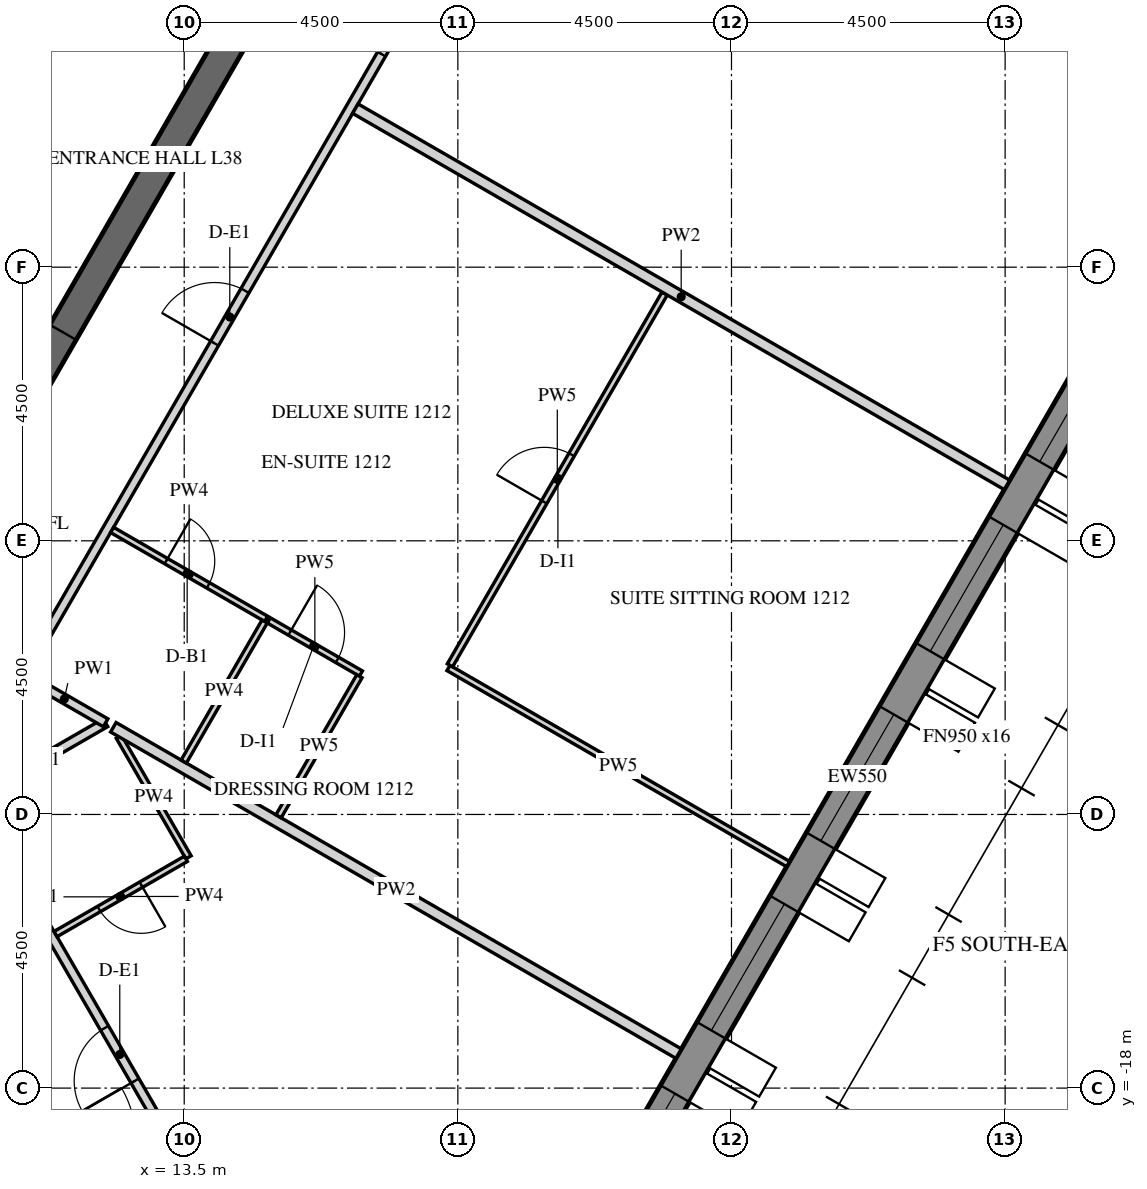
"""IFC4 building model, lengths in metres.
Left out: names, types, materials, properties, quantities, classifications, styles, units other than length and angle.
Written with IfcOpenShell. Run it as: python <this file> out.ifc"""

import sys

from ifc_helpers import new_model, si_unit, direction, frame, frame_2d, origin, place, context, subcontext, project, spatial, polyline, rectangle, outline, extrude, element, fill, save


model = new_model("IFC4")
c1 = context("Model", 3, precision=1e-05, world=origin(), true_north=direction((0.0, 1.0)))
c2 = subcontext(c1, "Body", "Model", "MODEL_VIEW")
j1 = project(units=[si_unit("LENGTHUNIT", "METRE"), si_unit("PLANEANGLEUNIT", "RADIAN")], contexts=[c1])
p1 = place(None, origin())
s1 = spatial("IfcSite", under=j1, at=p1, CompositionType="ELEMENT")
p2 = place(p1, origin())
s2 = spatial("IfcBuilding", under=s1, at=p2, CompositionType="ELEMENT")
p3 = place(p2, frame((0.0, 0.0, 164.4)))
s3 = spatial("IfcBuildingStorey", under=s2, at=p3, CompositionType="ELEMENT", Elevation=164.4)
p4 = place(p3, frame((17.63, -24.914, -0.15), z_axis=(0.0, 0.0, 1.0), x_axis=(0.499998569178, 0.866026229868, 0.0)))
e1 = element("IfcWall", 1, at=p4, inside=s3, PredefinedType="SOLIDWALL", context=c2, shape_type="SweptSolid", body=[
    extrude(outline(polyline([(-0.022, -0.275), (27.783, -0.275), (27.732, 0.275), (0.022, 0.275), (-0.022, -0.275)])), origin(), (0.0, 0.0, 1.0), 3.9),
])
p5 = place(p4, frame((1.879, 0.0, 1.05)))
e2 = element("IfcOpeningElement", 2, at=p5, cuts=e1, PredefinedType="OPENING", context=c2, shape_type="SweptSolid", body=[
    extrude(rectangle(XDim=2.4, YDim=2.4, at=frame_2d((1.2, 1.2))), frame((0.0, 0.285, 0.0), z_axis=(0.0, -1.0, 0.0), x_axis=(1.0, 0.0, 0.0)), (0.0, 0.0, 1.0), 0.57),
])
p6 = place(p4, frame((5.479, 0.0, 1.05)))
e3 = element("IfcOpeningElement", 3, at=p6, cuts=e1, PredefinedType="OPENING", context=c2, shape_type="SweptSolid", body=[
    extrude(rectangle(XDim=2.4, YDim=2.4, at=frame_2d((1.2, 1.2))), frame((0.0, 0.285, 0.0), z_axis=(0.0, -1.0, 0.0), x_axis=(1.0, 0.0, 0.0)), (0.0, 0.0, 1.0), 0.57),
])
p7 = place(p4, frame((9.079, 0.0, 1.05)))
e4 = element("IfcOpeningElement", 4, at=p7, cuts=e1, PredefinedType="OPENING", context=c2, shape_type="SweptSolid", body=[
    extrude(rectangle(XDim=2.4, YDim=2.4, at=frame_2d((1.2, 1.2))), frame((0.0, 0.285, 0.0), z_axis=(0.0, -1.0, 0.0), x_axis=(1.0, 0.0, 0.0)), (0.0, 0.0, 1.0), 0.57),
])
p8 = place(p4, frame((12.679, 0.0, 1.05)))
e5 = element("IfcOpeningElement", 5, at=p8, cuts=e1, PredefinedType="OPENING", context=c2, shape_type="SweptSolid", body=[
    extrude(rectangle(XDim=2.4, YDim=2.4, at=frame_2d((1.2, 1.2))), frame((0.0, 0.285, 0.0), z_axis=(0.0, -1.0, 0.0), x_axis=(1.0, 0.0, 0.0)), (0.0, 0.0, 1.0), 0.57),
])
p9 = place(p4, frame((16.279, 0.0, 1.05)))
e6 = element("IfcOpeningElement", 6, at=p9, cuts=e1, PredefinedType="OPENING", context=c2, shape_type="SweptSolid", body=[
    extrude(rectangle(XDim=2.4, YDim=2.4, at=frame_2d((1.2, 1.2))), frame((0.0, 0.285, 0.0), z_axis=(0.0, -1.0, 0.0), x_axis=(1.0, 0.0, 0.0)), (0.0, 0.0, 1.0), 0.57),
])
p10 = place(p4, frame((19.879, 0.0, 1.05)))
e7 = element("IfcOpeningElement", 7, at=p10, cuts=e1, PredefinedType="OPENING", context=c2, shape_type="SweptSolid", body=[
    extrude(rectangle(XDim=2.4, YDim=2.4, at=frame_2d((1.2, 1.2))), frame((0.0, 0.285, 0.0), z_axis=(0.0, -1.0, 0.0), x_axis=(1.0, 0.0, 0.0)), (0.0, 0.0, 1.0), 0.57),
])
p11 = place(p4, frame((23.479, 0.0, 1.05)))
e8 = element("IfcOpeningElement", 8, at=p11, cuts=e1, PredefinedType="OPENING", context=c2, shape_type="SweptSolid", body=[
    extrude(rectangle(XDim=2.4, YDim=2.4, at=frame_2d((1.2, 1.2))), frame((0.0, 0.285, 0.0), z_axis=(0.0, -1.0, 0.0), x_axis=(1.0, 0.0, 0.0)), (0.0, 0.0, 1.0), 0.57),
])
p12 = place(p3, frame((7.361, -12.75, -0.15), z_axis=(0.0, 0.0, 1.0), x_axis=(0.50000571537, 0.866022103989, 0.0)))
e9 = element("IfcWall", 9, at=p12, inside=s3, PredefinedType="SHEAR", context=c2, shape_type="SweptSolid", body=[
    extrude(outline(polyline([(-0.144, -0.25), (14.867, -0.25), (14.578, 0.25), (0.144, 0.25), (-0.144, -0.25)])), origin(), (0.0, 0.0, 1.0), 3.9),
])
p13 = place(p12, frame((6.49, 0.0, 0.15)))
e10 = element("IfcOpeningElement", 10, at=p13, cuts=e9, PredefinedType="OPENING", context=c2, shape_type="SweptSolid", body=[
    extrude(rectangle(XDim=1.8, YDim=2.4, at=frame_2d((0.9, 1.2))), frame((0.0, 0.26, 0.0), z_axis=(0.0, -1.0, 0.0), x_axis=(1.0, 0.0, 0.0)), (0.0, 0.0, 1.0), 0.52),
])
p14 = place(p3, frame((7.506, -13.0, -0.15), z_axis=(0.0, 0.0, 1.0), x_axis=(0.499988271576, -0.866032175087, 0.0)))
e11 = element("IfcWall", 11, at=p14, inside=s3, PredefinedType="SHEAR", context=c2, shape_type="SweptSolid", body=[
    extrude(rectangle(XDim=15.424, YDim=0.5, at=frame_2d((7.712, 0.0))), origin(), (0.0, 0.0, 1.0), 3.9),
])
p15 = place(p14, frame((6.812, 0.0, 0.15)))
e12 = element("IfcOpeningElement", 12, at=p15, cuts=e11, PredefinedType="OPENING", context=c2, shape_type="SweptSolid", body=[
    extrude(rectangle(XDim=1.8, YDim=2.4, at=frame_2d((0.9, 1.2))), frame((0.0, 0.26, 0.0), z_axis=(0.0, -1.0, 0.0), x_axis=(1.0, 0.0, 0.0)), (0.0, 0.0, 1.0), 0.52),
])
p16 = place(p3, frame((5.673, -9.825, -0.15), z_axis=(0.0, 0.0, 1.0), x_axis=(0.499995046907, 0.866028263435, 0.0)))
e13 = element("IfcWall", 13, at=p16, inside=s3, PredefinedType="SHEAR", context=c2, shape_type="SweptSolid", body=[
    extrude(outline(polyline([(-0.101, -0.175), (11.446, -0.175), (11.244, 0.175), (0.101, 0.175), (-0.101, -0.175)])), origin(), (0.0, 0.0, 1.0), 3.9),
])
p17 = place(p16, frame((4.801, 0.0, 0.15)))
e14 = element("IfcOpeningElement", 14, at=p17, cuts=e13, PredefinedType="OPENING", context=c2, shape_type="SweptSolid", body=[
    extrude(rectangle(XDim=1.8, YDim=2.4, at=frame_2d((0.9, 1.2))), frame((0.0, 0.185, 0.0), z_axis=(0.0, -1.0, 0.0), x_axis=(1.0, 0.0, 0.0)), (0.0, 0.0, 1.0), 0.37),
])
p18 = place(p3, frame((13.699, -19.628, 0.0), z_axis=(0.0, 0.0, 1.0), x_axis=(-0.499995202058, 0.86602817386, 0.0)))
e15 = element("IfcWall", 15, at=p18, inside=s3, PredefinedType="PARTITIONING", context=c2, shape_type="SweptSolid", body=[
    extrude(rectangle(XDim=7.361, YDim=0.15, at=frame_2d((3.68, 0.0))), origin(), (0.0, 0.0, 1.0), 2.988),
])
p19 = place(p18, frame((2.018, 0.0, 0.0)))
e16 = element("IfcOpeningElement", 16, at=p19, cuts=e15, PredefinedType="OPENING", context=c2, shape_type="SweptSolid", body=[
    extrude(rectangle(XDim=1.0, YDim=2.1, at=frame_2d((0.5, 1.05))), frame((0.0, 0.085, 0.0), z_axis=(0.0, -1.0, 0.0), x_axis=(1.0, 0.0, 0.0)), (0.0, 0.0, 1.0), 0.17),
])
p20 = place(p3, frame((10.084, -13.216, 0.0), z_axis=(0.0, 0.0, 1.0), x_axis=(0.866026229868, 0.499998569178, 0.0)))
e17 = element("IfcWall", 17, at=p20, inside=s3, PredefinedType="PARTITIONING", context=c2, shape_type="SweptSolid", body=[
    extrude(rectangle(XDim=2.449, YDim=0.15, at=frame_2d((1.225, 0.0))), origin(), (0.0, 0.0, 1.0), 2.988),
])
p21 = place(p3, frame((10.887, -11.144, 0.0), z_axis=(0.0, 0.0, 1.0), x_axis=(0.500006037985, 0.866021917724, 0.0)))
e18 = element("IfcWall", 18, at=p21, inside=s3, PredefinedType="PARTITIONING", context=c2, shape_type="SweptSolid", body=[
    extrude(rectangle(XDim=12.867, YDim=0.15, at=frame_2d((6.434, 0.0))), origin(), (0.0, 0.0, 1.0), 2.988),
])
p22 = place(p21, frame((6.225, 0.0, 0.0)))
e19 = element("IfcOpeningElement", 19, at=p22, cuts=e18, PredefinedType="OPENING", context=c2, shape_type="SweptSolid", body=[
    extrude(rectangle(XDim=1.0, YDim=2.1, at=frame_2d((0.5, 1.05))), frame((0.0, 0.085, 0.0), z_axis=(0.0, -1.0, 0.0), x_axis=(1.0, 0.0, 0.0)), (0.0, 0.0, 1.0), 0.17),
])
p23 = place(p21, frame((11.717, 0.0, 0.0)))
e20 = element("IfcOpeningElement", 20, at=p23, cuts=e18, PredefinedType="OPENING", context=c2, shape_type="SweptSolid", body=[
    extrude(rectangle(XDim=1.0, YDim=2.1, at=frame_2d((0.5, 1.05))), frame((0.0, 0.085, 0.0), z_axis=(0.0, -1.0, 0.0), x_axis=(1.0, 0.0, 0.0)), (0.0, 0.0, 1.0), 0.17),
])
p24 = place(p3, frame((12.208, -11.993, 0.0), z_axis=(0.0, 0.0, 1.0), x_axis=(-0.866011891242, 0.50002340368, 0.0)))
e21 = element("IfcWall", 21, at=p24, inside=s3, PredefinedType="PARTITIONING", context=c2, shape_type="SweptSolid", body=[
    extrude(rectangle(XDim=1.568, YDim=0.15, at=frame_2d((0.784, 0.0))), origin(), (0.0, 0.0, 1.0), 2.988),
])
p25 = place(p3, frame((12.426, -12.223, 0.0), z_axis=(0.0, 0.0, 1.0), x_axis=(0.499959451571, -0.866048813165, 0.0)))
e22 = element("IfcWall", 22, at=p25, inside=s3, PredefinedType="PARTITIONING", context=c2, shape_type="SweptSolid", body=[
    extrude(rectangle(XDim=2.289, YDim=0.1, at=frame_2d((1.145, 0.0))), origin(), (0.0, 0.0, 1.0), 2.988),
])
p26 = place(p3, frame((13.527, -14.23, 0.0), z_axis=(0.0, 0.0, 1.0), x_axis=(-0.866006523861, -0.500032699561, 0.0)))
e23 = element("IfcWall", 23, at=p26, inside=s3, PredefinedType="PARTITIONING", context=c2, shape_type="SweptSolid", body=[
    extrude(rectangle(XDim=2.475, YDim=0.1, at=frame_2d((1.237, 0.0))), origin(), (0.0, 0.0, 1.0), 2.988),
])
p27 = place(p26, frame((0.85, 0.0, 0.0)))
e24 = element("IfcOpeningElement", 24, at=p27, cuts=e23, PredefinedType="OPENING", context=c2, shape_type="SweptSolid", body=[
    extrude(rectangle(XDim=0.8, YDim=2.1, at=frame_2d((0.4, 1.05))), frame((0.0, 0.06, 0.0), z_axis=(0.0, -1.0, 0.0), x_axis=(1.0, 0.0, 0.0)), (0.0, 0.0, 1.0), 0.12),
])
p28 = place(p3, frame((21.631, -17.433, 0.0), z_axis=(0.0, 0.0, 1.0), x_axis=(-0.866030310389, 0.499991501415, 0.0)))
e25 = element("IfcWall", 25, at=p28, inside=s3, PredefinedType="PARTITIONING", context=c2, shape_type="SweptSolid", body=[
    extrude(rectangle(XDim=10.735, YDim=0.18, at=frame_2d((5.368, 0.0))), origin(), (0.0, 0.0, 1.0), 2.988),
])
p29 = place(p3, frame((12.314, -8.821, 0.0), z_axis=(0.0, 0.0, 1.0), x_axis=(0.866046596414, -0.499963291492, 0.0)))
e26 = element("IfcWall", 26, at=p29, inside=s3, PredefinedType="PARTITIONING", context=c2, shape_type="SweptSolid", body=[
    extrude(rectangle(XDim=2.925, YDim=0.1, at=frame_2d((1.462, 0.0))), origin(), (0.0, 0.0, 1.0), 2.988),
])
p30 = place(p29, frame((1.025, 0.0, 0.0)))
e27 = element("IfcOpeningElement", 27, at=p30, cuts=e26, PredefinedType="OPENING", context=c2, shape_type="SweptSolid", body=[
    extrude(rectangle(XDim=0.8, YDim=2.1, at=frame_2d((0.4, 1.05))), frame((0.0, 0.06, 0.0), z_axis=(0.0, -1.0, 0.0), x_axis=(1.0, 0.0, 0.0)), (0.0, 0.0, 1.0), 0.12),
])
p31 = place(p3, frame((14.891, -10.309, 0.0), z_axis=(0.0, 0.0, 1.0), x_axis=(0.866036909293, -0.499980071345, 0.0)))
e28 = element("IfcWall", 28, at=p31, inside=s3, PredefinedType="PARTITIONING", context=c2, shape_type="SweptSolid", body=[
    extrude(rectangle(XDim=1.75, YDim=0.1, at=frame_2d((0.875, 0.0))), origin(), (0.0, 0.0, 1.0), 2.988),
])
p32 = place(p31, frame((0.4, 0.0, 0.0)))
e29 = element("IfcOpeningElement", 29, at=p32, cuts=e28, PredefinedType="OPENING", context=c2, shape_type="SweptSolid", body=[
    extrude(rectangle(XDim=0.9, YDim=2.1, at=frame_2d((0.45, 1.05))), frame((0.0, 0.06, 0.0), z_axis=(0.0, -1.0, 0.0), x_axis=(1.0, 0.0, 0.0)), (0.0, 0.0, 1.0), 0.12),
])
p33 = place(p3, frame((16.381, -11.227, 0.0), z_axis=(0.0, 0.0, 1.0), x_axis=(-0.500008456887, -0.866020521143, 0.0)))
e30 = element("IfcWall", 30, at=p33, inside=s3, PredefinedType="PARTITIONING", context=c2, shape_type="SweptSolid", body=[
    extrude(rectangle(XDim=2.66, YDim=0.1, at=frame_2d((1.33, 0.0))), origin(), (0.0, 0.0, 1.0), 2.988),
])
p34 = place(p3, frame((23.431, -14.316, 0.0), z_axis=(0.0, 0.0, 1.0), x_axis=(-0.86603809205, 0.499978022635, 0.0)))
e31 = element("IfcWall", 31, at=p34, inside=s3, PredefinedType="PARTITIONING", context=c2, shape_type="SweptSolid", body=[
    extrude(rectangle(XDim=6.45, YDim=0.1, at=frame_2d((3.225, 0.0))), origin(), (0.0, 0.0, 1.0), 2.988),
])
p35 = place(p3, frame((17.87, -11.047, 0.0), z_axis=(0.0, 0.0, 1.0), x_axis=(0.500010820671, 0.866019156377, 0.0)))
e32 = element("IfcWall", 32, at=p35, inside=s3, PredefinedType="PARTITIONING", context=c2, shape_type="SweptSolid", body=[
    extrude(rectangle(XDim=7.06, YDim=0.1, at=frame_2d((3.53, 0.0))), origin(), (0.0, 0.0, 1.0), 2.988),
])
p36 = place(p35, frame((3.1, 0.0, 0.0)))
e33 = element("IfcOpeningElement", 33, at=p36, cuts=e32, PredefinedType="OPENING", context=c2, shape_type="SweptSolid", body=[
    extrude(rectangle(XDim=0.9, YDim=2.1, at=frame_2d((0.45, 1.05))), frame((0.0, 0.06, 0.0), z_axis=(0.0, -1.0, 0.0), x_axis=(1.0, 0.0, 0.0)), (0.0, 0.0, 1.0), 0.12),
])
p37 = place(p3, frame((27.031, -8.08, 0.0), z_axis=(0.0, 0.0, 1.0), x_axis=(-0.866024931941, 0.500000817256, 0.0)))
e34 = element("IfcWall", 34, at=p37, inside=s3, PredefinedType="PARTITIONING", context=c2, shape_type="SweptSolid", body=[
    extrude(rectangle(XDim=12.375, YDim=0.18, at=frame_2d((6.188, 0.0))), origin(), (0.0, 0.0, 1.0), 2.988),
])
p38 = place(p3, frame((13.492, -12.63, 0.0), z_axis=(0.0, 0.0, 1.0), x_axis=(0.50004820116, 0.865997573043, 0.0)))
e35 = element("IfcWall", 35, at=p38, inside=s3, PredefinedType="PARTITIONING", context=c2, shape_type="SweptSolid", body=[
    extrude(rectangle(XDim=2.66, YDim=0.1, at=frame_2d((1.33, 0.0))), origin(), (0.0, 0.0, 1.0), 2.988),
])
p39 = place(p6, frame((0.0, 0.205, 0.0)))
e36 = element("IfcWindow", 36, at=p39, inside=s3, PartitioningType="DOUBLE_PANEL_VERTICAL", PredefinedType="WINDOW", context=c2, shape_type="SweptSolid", body=[
    extrude(rectangle(XDim=2.4, YDim=2.4, at=frame_2d((1.2, 1.2))), frame((0.0, 0.03, 0.0), z_axis=(0.0, -1.0, 0.0), x_axis=(1.0, 0.0, 0.0)), (0.0, 0.0, 1.0), 0.06),
])
fill(e3, e36)
p40 = place(p7, frame((0.0, 0.205, 0.0)))
e37 = element("IfcWindow", 37, at=p40, inside=s3, PartitioningType="DOUBLE_PANEL_VERTICAL", PredefinedType="WINDOW", context=c2, shape_type="SweptSolid", body=[
    extrude(rectangle(XDim=2.4, YDim=2.4, at=frame_2d((1.2, 1.2))), frame((0.0, 0.03, 0.0), z_axis=(0.0, -1.0, 0.0), x_axis=(1.0, 0.0, 0.0)), (0.0, 0.0, 1.0), 0.06),
])
fill(e4, e37)
p41 = place(p8, frame((0.0, 0.205, 0.0)))
e38 = element("IfcWindow", 38, at=p41, inside=s3, PartitioningType="DOUBLE_PANEL_VERTICAL", PredefinedType="WINDOW", context=c2, shape_type="SweptSolid", body=[
    extrude(rectangle(XDim=2.4, YDim=2.4, at=frame_2d((1.2, 1.2))), frame((0.0, 0.03, 0.0), z_axis=(0.0, -1.0, 0.0), x_axis=(1.0, 0.0, 0.0)), (0.0, 0.0, 1.0), 0.06),
])
fill(e5, e38)
p42 = place(p9, frame((0.0, 0.205, 0.0)))
e39 = element("IfcWindow", 39, at=p42, inside=s3, PartitioningType="DOUBLE_PANEL_VERTICAL", PredefinedType="WINDOW", context=c2, shape_type="SweptSolid", body=[
    extrude(rectangle(XDim=2.4, YDim=2.4, at=frame_2d((1.2, 1.2))), frame((0.0, 0.03, 0.0), z_axis=(0.0, -1.0, 0.0), x_axis=(1.0, 0.0, 0.0)), (0.0, 0.0, 1.0), 0.06),
])
fill(e6, e39)
p43 = place(p10, frame((0.0, 0.205, 0.0)))
e40 = element("IfcWindow", 40, at=p43, inside=s3, PartitioningType="DOUBLE_PANEL_VERTICAL", PredefinedType="WINDOW", context=c2, shape_type="SweptSolid", body=[
    extrude(rectangle(XDim=2.4, YDim=2.4, at=frame_2d((1.2, 1.2))), frame((0.0, 0.03, 0.0), z_axis=(0.0, -1.0, 0.0), x_axis=(1.0, 0.0, 0.0)), (0.0, 0.0, 1.0), 0.06),
])
fill(e7, e40)
p44 = place(p13, origin())
e41 = element("IfcDoor", 41, at=p44, inside=s3, OperationType="DOUBLE_DOOR_SINGLE_SWING", PredefinedType="DOOR", context=c2, shape_type="SweptSolid", body=[
    extrude(rectangle(XDim=1.8, YDim=2.4, at=frame_2d((0.9, 1.2))), frame((0.0, 0.025, 0.0), z_axis=(0.0, -1.0, 0.0), x_axis=(1.0, 0.0, 0.0)), (0.0, 0.0, 1.0), 0.05),
])
fill(e10, e41)
p45 = place(p19, origin())
e42 = element("IfcDoor", 42, at=p45, inside=s3, OperationType="SINGLE_SWING_LEFT", PredefinedType="DOOR", context=c2, shape_type="SweptSolid", body=[
    extrude(rectangle(XDim=1.0, YDim=2.1, at=frame_2d((0.5, 1.05))), frame((0.0, 0.025, 0.0), z_axis=(0.0, -1.0, 0.0), x_axis=(1.0, 0.0, 0.0)), (0.0, 0.0, 1.0), 0.05),
])
fill(e16, e42)
p46 = place(p27, origin())
e43 = element("IfcDoor", 43, at=p46, inside=s3, OperationType="SINGLE_SWING_RIGHT", PredefinedType="DOOR", context=c2, shape_type="SweptSolid", body=[
    extrude(rectangle(XDim=0.8, YDim=2.1, at=frame_2d((0.4, 1.05))), frame((0.0, 0.025, 0.0), z_axis=(0.0, -1.0, 0.0), x_axis=(1.0, 0.0, 0.0)), (0.0, 0.0, 1.0), 0.05),
])
fill(e24, e43)
p47 = place(p22, origin())
e44 = element("IfcDoor", 44, at=p47, inside=s3, OperationType="SINGLE_SWING_LEFT", PredefinedType="DOOR", context=c2, shape_type="SweptSolid", body=[
    extrude(rectangle(XDim=1.0, YDim=2.1, at=frame_2d((0.5, 1.05))), frame((0.0, 0.025, 0.0), z_axis=(0.0, -1.0, 0.0), x_axis=(1.0, 0.0, 0.0)), (0.0, 0.0, 1.0), 0.05),
])
fill(e19, e44)
p48 = place(p30, origin())
e45 = element("IfcDoor", 45, at=p48, inside=s3, OperationType="SINGLE_SWING_RIGHT", PredefinedType="DOOR", context=c2, shape_type="SweptSolid", body=[
    extrude(rectangle(XDim=0.8, YDim=2.1, at=frame_2d((0.4, 1.05))), frame((0.0, 0.025, 0.0), z_axis=(0.0, -1.0, 0.0), x_axis=(1.0, 0.0, 0.0)), (0.0, 0.0, 1.0), 0.05),
])
fill(e27, e45)
p49 = place(p32, origin())
e46 = element("IfcDoor", 46, at=p49, inside=s3, OperationType="SINGLE_SWING_RIGHT", PredefinedType="DOOR", context=c2, shape_type="SweptSolid", body=[
    extrude(rectangle(XDim=0.9, YDim=2.1, at=frame_2d((0.45, 1.05))), frame((0.0, 0.025, 0.0), z_axis=(0.0, -1.0, 0.0), x_axis=(1.0, 0.0, 0.0)), (0.0, 0.0, 1.0), 0.05),
])
fill(e29, e46)
p50 = place(p36, origin())
e47 = element("IfcDoor", 47, at=p50, inside=s3, OperationType="SINGLE_SWING_LEFT", PredefinedType="DOOR", context=c2, shape_type="SweptSolid", body=[
    extrude(rectangle(XDim=0.9, YDim=2.1, at=frame_2d((0.45, 1.05))), frame((0.0, 0.025, 0.0), z_axis=(0.0, -1.0, 0.0), x_axis=(1.0, 0.0, 0.0)), (0.0, 0.0, 1.0), 0.05),
])
fill(e33, e47)
p51 = place(p23, origin())
e48 = element("IfcDoor", 48, at=p51, inside=s3, OperationType="SINGLE_SWING_LEFT", PredefinedType="DOOR", context=c2, shape_type="SweptSolid", body=[
    extrude(rectangle(XDim=1.0, YDim=2.1, at=frame_2d((0.5, 1.05))), frame((0.0, 0.025, 0.0), z_axis=(0.0, -1.0, 0.0), x_axis=(1.0, 0.0, 0.0)), (0.0, 0.0, 1.0), 0.05),
])
fill(e20, e48)
save(model, sys.argv[1])
